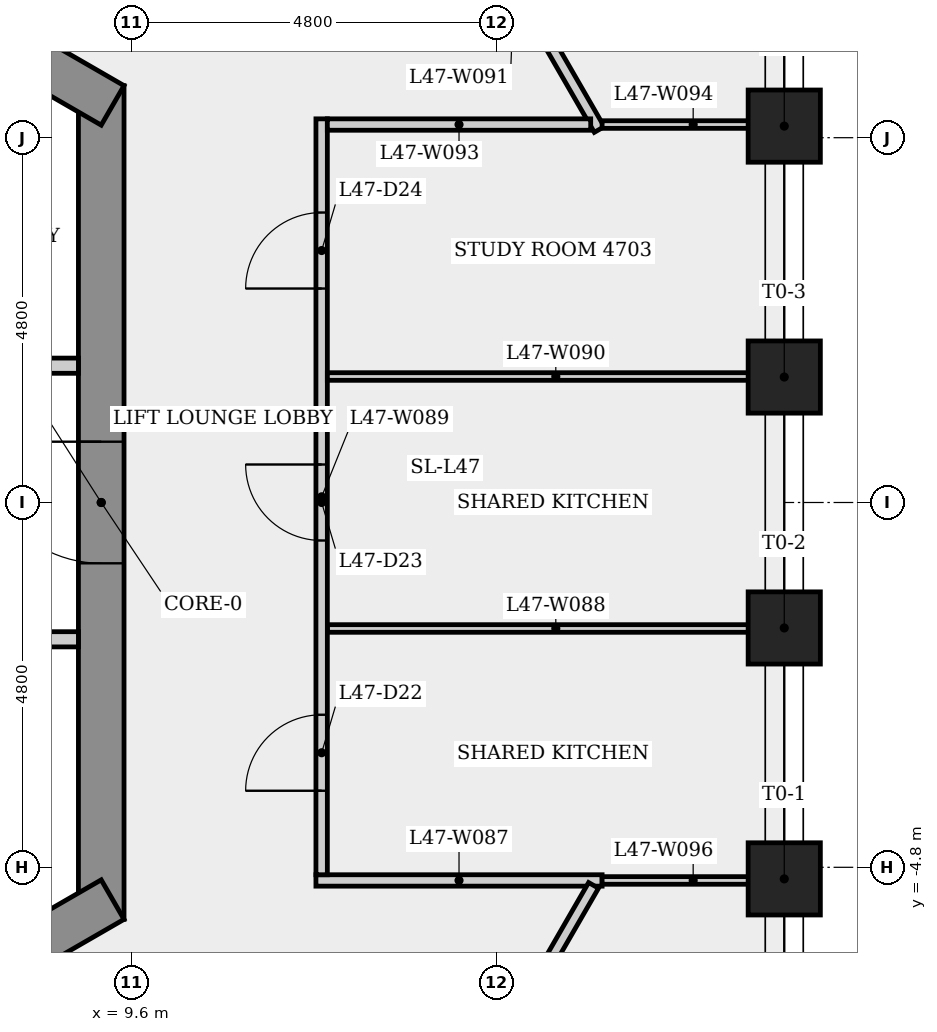
"""IFC4 building model, lengths in metres.
Left out: names, types, materials, properties, quantities, classifications, styles, units other than length and angle.
Written with IfcOpenShell. Run it as: python <this file> out.ifc"""

import sys

from ifc_helpers import new_model, si_unit, direction, frame, frame_2d, origin, origin_2d, place, context, subcontext, project, spatial, rectangle, extrude, element, fill, save


model = new_model("IFC4")
c1 = context("Model", 3, precision=1e-05, world=origin(), true_north=direction((0.0, 1.0)))
c2 = subcontext(c1, "Body", "Model", "MODEL_VIEW")
j1 = project(units=[si_unit("LENGTHUNIT", "METRE"), si_unit("PLANEANGLEUNIT", "RADIAN")], contexts=[c1])
p1 = place(None, origin())
s1 = spatial("IfcSite", under=j1, at=p1, CompositionType="ELEMENT")
p2 = place(p1, origin())
s2 = spatial("IfcBuilding", under=s1, at=p2, CompositionType="ELEMENT")
p3 = place(p2, frame((0.0, 0.0, 176.5)))
s3 = spatial("IfcBuildingStorey", under=s2, at=p3, CompositionType="ELEMENT", Elevation=176.5)
p4 = place(p3, frame((9.2, -5.485, 0.0), z_axis=(0.0, 0.0, 1.0), x_axis=(0.0, 1.0, 0.0)))
e1 = element("IfcWall", 1, at=p4, inside=s3, PredefinedType="SHEAR", context=c2, shape_type="SweptSolid", body=[
    extrude(rectangle(XDim=10.97, YDim=0.6, at=frame_2d((5.485, 0.0))), origin(), (0.0, 0.0, 1.0), 3.4),
])
p5 = place(p4, frame((4.685, 0.0, 0.0)))
e2 = element("IfcOpeningElement", 2, at=p5, cuts=e1, PredefinedType="OPENING", context=c2, shape_type="SweptSolid", body=[
    extrude(rectangle(XDim=1.6, YDim=2.1, at=frame_2d((0.8, 1.05))), frame((0.0, 0.31, 0.0), z_axis=(0.0, -1.0, 0.0), x_axis=(1.0, 0.0, 0.0)), (0.0, 0.0, 1.0), 0.62),
])
p6 = place(p3, frame((9.35, 5.225, 0.0), z_axis=(0.0, 0.0, 1.0), x_axis=(-0.866023993627, 0.500002442456, 0.0)))
e3 = element("IfcWall", 3, at=p6, inside=s3, PredefinedType="SHEAR", context=c2, shape_type="SweptSolid", body=[
    extrude(rectangle(XDim=10.97, YDim=0.6, at=frame_2d((5.485, 0.0))), origin(), (0.0, 0.0, 1.0), 3.4),
])
p7 = place(p6, frame((8.325, 0.0, 0.0)))
e4 = element("IfcOpeningElement", 4, at=p7, cuts=e3, PredefinedType="OPENING", context=c2, shape_type="SweptSolid", body=[
    extrude(rectangle(XDim=0.9, YDim=2.1, at=frame_2d((0.45, 1.05))), frame((0.0, 0.31, 0.0), z_axis=(0.0, -1.0, 0.0), x_axis=(1.0, 0.0, 0.0)), (0.0, 0.0, 1.0), 0.62),
])
p8 = place(p6, frame((1.518, 0.0, 0.0)))
e5 = element("IfcOpeningElement", 5, at=p8, cuts=e3, PredefinedType="OPENING", context=c2, shape_type="SweptSolid", body=[
    extrude(rectangle(XDim=0.9, YDim=2.1, at=frame_2d((0.45, 1.05))), frame((0.0, 0.31, 0.0), z_axis=(0.0, -1.0, 0.0), x_axis=(1.0, 0.0, 0.0)), (0.0, 0.0, 1.0), 0.62),
])
p9 = place(p3, frame((-0.15, -10.71, 0.0), z_axis=(0.0, 0.0, 1.0), x_axis=(0.866023993627, 0.500002442456, 0.0)))
e6 = element("IfcWall", 6, at=p9, inside=s3, PredefinedType="SHEAR", context=c2, shape_type="SweptSolid", body=[
    extrude(rectangle(XDim=10.97, YDim=0.6, at=frame_2d((5.485, 0.0))), origin(), (0.0, 0.0, 1.0), 3.4),
])
p10 = place(p9, frame((0.9, 0.0, 0.0)))
e7 = element("IfcOpeningElement", 7, at=p10, cuts=e6, PredefinedType="OPENING", context=c2, shape_type="SweptSolid", body=[
    extrude(rectangle(XDim=0.9, YDim=2.1, at=frame_2d((0.45, 1.05))), frame((0.0, 0.31, 0.0), z_axis=(0.0, -1.0, 0.0), x_axis=(1.0, 0.0, 0.0)), (0.0, 0.0, 1.0), 0.62),
])
p11 = place(p9, frame((7.512, 0.0, 0.0)))
e8 = element("IfcOpeningElement", 8, at=p11, cuts=e6, PredefinedType="OPENING", context=c2, shape_type="SweptSolid", body=[
    extrude(rectangle(XDim=0.9, YDim=2.1, at=frame_2d((0.45, 1.05))), frame((0.0, 0.31, 0.0), z_axis=(0.0, -1.0, 0.0), x_axis=(1.0, 0.0, 0.0)), (0.0, 0.0, 1.0), 0.62),
])
for number, where, z_axis, x_axis in (
    (9, (18.187, -4.952, 0.0), (0.0, 0.0, 1.0), (1.0, 0.0, 0.0)),
    (10, (18.187, -1.651, 0.0), (0.0, 0.0, 1.0), (1.0, 0.0, 0.0)),
    (11, (18.187, 1.651, 0.0), (0.0, 0.0, 1.0), (1.0, 0.0, 0.0)),
    (12, (18.187, 4.952, 0.0), (0.0, 0.0, 1.0), (1.0, 0.0, 0.0)),
):
    element("IfcColumn", number, at=place(p3, frame(where, z_axis=z_axis, x_axis=x_axis)), inside=s3, PredefinedType="COLUMN", context=c2, shape_type="SweptSolid", body=[
        extrude(rectangle(XDim=0.95, YDim=0.95, at=origin_2d()), origin(), (0.0, 0.0, 1.0), 3.4),
    ])
for number, where, z_axis, x_axis in (
    (13, (7.475, 1.8, 0.0), (0.0, 0.0, 1.0), (1.0, 0.0, 0.0)),
    (14, (8.9, -1.8, 0.0), (0.0, 0.0, 1.0), (-1.0, 0.0, 0.0)),
):
    element("IfcWall", number, at=place(p3, frame(where, z_axis=z_axis, x_axis=x_axis)), inside=s3, PredefinedType="PARTITIONING", context=c2, shape_type="SweptSolid", body=[
        extrude(rectangle(XDim=1.425, YDim=0.2, at=frame_2d((0.712, 0.0))), origin(), (0.0, 0.0, 1.0), 3.05),
    ])
p12 = place(p3, frame((12.025, -4.973, 0.0), z_axis=(0.0, 0.0, 1.0), x_axis=(1.0, 0.0, 0.0)))
e15 = element("IfcWall", 15, at=p12, inside=s3, PredefinedType="PARTITIONING", context=c2, shape_type="SweptSolid", body=[
    extrude(rectangle(XDim=3.765, YDim=0.15, at=frame_2d((1.883, 0.0))), origin(), (0.0, 0.0, 1.0), 3.05),
])
p13 = place(p3, frame((12.175, -1.658, 0.0), z_axis=(0.0, 0.0, 1.0), x_axis=(1.0, 0.0, 0.0)))
e16 = element("IfcWall", 16, at=p13, inside=s3, PredefinedType="PARTITIONING", context=c2, shape_type="SweptSolid", body=[
    extrude(rectangle(XDim=6.011, YDim=0.1, at=frame_2d((3.006, 0.0))), origin(), (0.0, 0.0, 1.0), 3.05),
])
p14 = place(p3, frame((12.1, -4.898, 0.0), z_axis=(0.0, 0.0, 1.0), x_axis=(0.0, 1.0, 0.0)))
e17 = element("IfcWall", 17, at=p14, inside=s3, PredefinedType="PARTITIONING", context=c2, shape_type="SweptSolid", body=[
    extrude(rectangle(XDim=9.946, YDim=0.15, at=frame_2d((4.973, 0.0))), origin(), (0.0, 0.0, 1.0), 3.05),
])
p15 = place(p14, frame((1.105, 0.0, 0.0)))
e18 = element("IfcOpeningElement", 18, at=p15, cuts=e17, PredefinedType="OPENING", context=c2, shape_type="SweptSolid", body=[
    extrude(rectangle(XDim=1.0, YDim=2.1, at=frame_2d((0.5, 1.05))), frame((0.0, 0.085, 0.0), z_axis=(0.0, -1.0, 0.0), x_axis=(1.0, 0.0, 0.0)), (0.0, 0.0, 1.0), 0.17),
])
p16 = place(p14, frame((4.398, 0.0, 0.0)))
e19 = element("IfcOpeningElement", 19, at=p16, cuts=e17, PredefinedType="OPENING", context=c2, shape_type="SweptSolid", body=[
    extrude(rectangle(XDim=1.0, YDim=2.1, at=frame_2d((0.5, 1.05))), frame((0.0, 0.085, 0.0), z_axis=(0.0, -1.0, 0.0), x_axis=(1.0, 0.0, 0.0)), (0.0, 0.0, 1.0), 0.17),
])
p17 = place(p14, frame((7.713, 0.0, 0.0)))
e20 = element("IfcOpeningElement", 20, at=p17, cuts=e17, PredefinedType="OPENING", context=c2, shape_type="SweptSolid", body=[
    extrude(rectangle(XDim=1.0, YDim=2.1, at=frame_2d((0.5, 1.05))), frame((0.0, 0.085, 0.0), z_axis=(0.0, -1.0, 0.0), x_axis=(1.0, 0.0, 0.0)), (0.0, 0.0, 1.0), 0.17),
])
p18 = place(p3, frame((12.175, 1.658, 0.0), z_axis=(0.0, 0.0, 1.0), x_axis=(1.0, 0.0, 0.0)))
e21 = element("IfcWall", 21, at=p18, inside=s3, PredefinedType="PARTITIONING", context=c2, shape_type="SweptSolid", body=[
    extrude(rectangle(XDim=6.011, YDim=0.1, at=frame_2d((3.006, 0.0))), origin(), (0.0, 0.0, 1.0), 3.05),
])
p19 = place(p3, frame((13.512, 8.788, 0.0), z_axis=(0.0, 0.0, 1.0), x_axis=(0.499989762656, -0.866031314237, 0.0)))
e22 = element("IfcWall", 22, at=p19, inside=s3, PredefinedType="PARTITIONING", context=c2, shape_type="SweptSolid", body=[
    extrude(rectangle(XDim=4.48, YDim=0.15, at=frame_2d((2.24, 0.0))), origin(), (0.0, 0.0, 1.0), 3.05),
])
p20 = place(p19, frame((1.685, 0.0, 0.0)))
e23 = element("IfcOpeningElement", 23, at=p20, cuts=e22, PredefinedType="OPENING", context=c2, shape_type="SweptSolid", body=[
    extrude(rectangle(XDim=1.0, YDim=2.1, at=frame_2d((0.5, 1.05))), frame((0.0, 0.085, 0.0), z_axis=(0.0, -1.0, 0.0), x_axis=(1.0, 0.0, 0.0)), (0.0, 0.0, 1.0), 0.17),
])
p21 = place(p3, frame((15.64, 4.973, 0.0), z_axis=(0.0, 0.0, 1.0), x_axis=(-1.0, 0.0, 0.0)))
e24 = element("IfcWall", 24, at=p21, inside=s3, PredefinedType="PARTITIONING", context=c2, shape_type="SweptSolid", body=[
    extrude(rectangle(XDim=3.465, YDim=0.15, at=frame_2d((1.732, 0.0))), origin(), (0.0, 0.0, 1.0), 3.05),
])
p22 = place(p3, frame((15.79, 4.973, 0.0), z_axis=(0.0, 0.0, 1.0), x_axis=(1.0, 0.0, 0.0)))
e25 = element("IfcWall", 25, at=p22, inside=s3, PredefinedType="PARTITIONING", context=c2, shape_type="SweptSolid", body=[
    extrude(rectangle(XDim=2.396, YDim=0.1, at=frame_2d((1.198, 0.0))), origin(), (0.0, 0.0, 1.0), 3.05),
])
p23 = place(p3, frame((15.677, -5.038, 0.0), z_axis=(0.0, 0.0, 1.0), x_axis=(-0.500005339912, -0.866022320763, 0.0)))
e26 = element("IfcWall", 26, at=p23, inside=s3, PredefinedType="PARTITIONING", context=c2, shape_type="SweptSolid", body=[
    extrude(rectangle(XDim=7.844, YDim=0.15, at=frame_2d((3.922, 0.0))), origin(), (0.0, 0.0, 1.0), 3.05),
])
p24 = place(p23, frame((3.422, 0.0, 0.0)))
e27 = element("IfcOpeningElement", 27, at=p24, cuts=e26, PredefinedType="OPENING", context=c2, shape_type="SweptSolid", body=[
    extrude(rectangle(XDim=1.0, YDim=2.1, at=frame_2d((0.5, 1.05))), frame((0.0, 0.085, 0.0), z_axis=(0.0, -1.0, 0.0), x_axis=(1.0, 0.0, 0.0)), (0.0, 0.0, 1.0), 0.17),
])
p25 = place(p3, frame((18.187, -4.973, 0.0), z_axis=(0.0, 0.0, 1.0), x_axis=(-1.0, 0.0, 0.0)))
e28 = element("IfcWall", 28, at=p25, inside=s3, PredefinedType="PARTITIONING", context=c2, shape_type="SweptSolid", body=[
    extrude(rectangle(XDim=2.397, YDim=0.1, at=frame_2d((1.198, 0.0))), origin(), (0.0, 0.0, 1.0), 3.05),
])
p26 = place(p15, origin())
e29 = element("IfcDoor", 29, at=p26, inside=s3, OperationType="SINGLE_SWING_LEFT", PredefinedType="DOOR", context=c2, shape_type="SweptSolid", body=[
    extrude(rectangle(XDim=1.0, YDim=2.1, at=frame_2d((0.5, 1.05))), frame((0.0, 0.025, 0.0), z_axis=(0.0, -1.0, 0.0), x_axis=(1.0, 0.0, 0.0)), (0.0, 0.0, 1.0), 0.05),
])
fill(e18, e29)
p27 = place(p16, origin())
e30 = element("IfcDoor", 30, at=p27, inside=s3, OperationType="SINGLE_SWING_RIGHT", PredefinedType="DOOR", context=c2, shape_type="SweptSolid", body=[
    extrude(rectangle(XDim=1.0, YDim=2.1, at=frame_2d((0.5, 1.05))), frame((0.0, 0.025, 0.0), z_axis=(0.0, -1.0, 0.0), x_axis=(1.0, 0.0, 0.0)), (0.0, 0.0, 1.0), 0.05),
])
fill(e19, e30)
p28 = place(p17, origin())
e31 = element("IfcDoor", 31, at=p28, inside=s3, OperationType="SINGLE_SWING_LEFT", PredefinedType="DOOR", context=c2, shape_type="SweptSolid", body=[
    extrude(rectangle(XDim=1.0, YDim=2.1, at=frame_2d((0.5, 1.05))), frame((0.0, 0.025, 0.0), z_axis=(0.0, -1.0, 0.0), x_axis=(1.0, 0.0, 0.0)), (0.0, 0.0, 1.0), 0.05),
])
fill(e20, e31)
p29 = place(p5, origin())
e32 = element("IfcDoor", 32, at=p29, inside=s3, OperationType="SINGLE_SWING_RIGHT", PredefinedType="DOOR", context=c2, shape_type="SweptSolid", body=[
    extrude(rectangle(XDim=1.6, YDim=2.1, at=frame_2d((0.8, 1.05))), frame((0.0, 0.025, 0.0), z_axis=(0.0, -1.0, 0.0), x_axis=(1.0, 0.0, 0.0)), (0.0, 0.0, 1.0), 0.05),
])
fill(e2, e32)
save(model, sys.argv[1])
